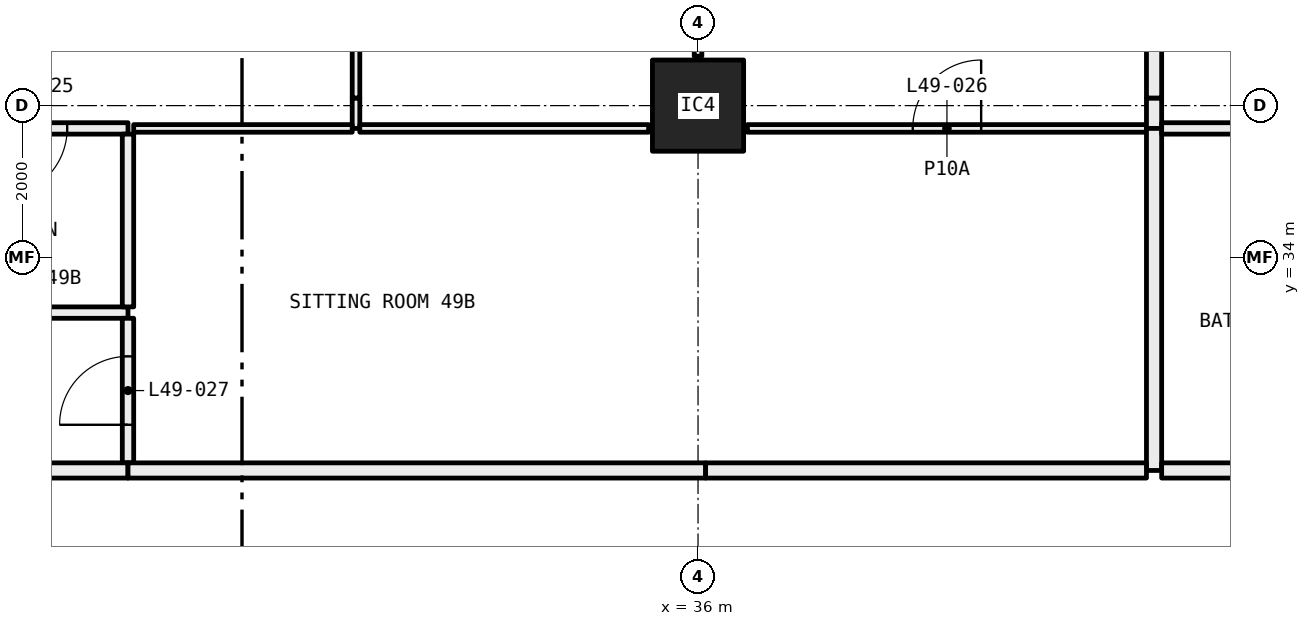
"""IFC4 building model, lengths in metres.
Left out: names, types, materials, properties, quantities, classifications, styles, units other than length and angle.
Written with IfcOpenShell. Run it as: python <this file> out.ifc"""

import sys

from ifc_helpers import new_model, si_unit, direction, frame, frame_2d, origin, origin_2d, place, context, subcontext, project, spatial, rectangle, hollow_rectangle, extrude, element, fill, save


model = new_model("IFC4")
c1 = context("Model", 3, precision=1e-05, world=origin(), true_north=direction((0.0, 1.0)))
c2 = subcontext(c1, "Body", "Model", "MODEL_VIEW")
j1 = project(units=[si_unit("LENGTHUNIT", "METRE"), si_unit("PLANEANGLEUNIT", "RADIAN")], contexts=[c1])
p1 = place(None, origin())
s1 = spatial("IfcSite", under=j1, at=p1, CompositionType="ELEMENT")
p2 = place(p1, origin())
s2 = spatial("IfcBuilding", under=s1, at=p2, CompositionType="ELEMENT")
p3 = place(p2, frame((0.0, 0.0, 185.85)))
s3 = spatial("IfcBuildingStorey", under=s2, at=p3, CompositionType="ELEMENT", Elevation=185.85)
p4 = place(p3, frame((36.0, 36.0, 0.0), z_axis=(0.0, 0.0, 1.0), x_axis=(1.0, 0.0, 0.0)))
e1 = element("IfcColumn", 1, at=p4, inside=s3, PredefinedType="COLUMN", context=c2, shape_type="SweptSolid", body=[
    extrude(hollow_rectangle(XDim=1.2, YDim=1.2, WallThickness=0.05, at=origin_2d()), origin(), (0.0, 0.0, 1.0), 3.05),
])
p5 = place(p3, frame((31.5, 35.7, 0.0), z_axis=(0.0, 0.0, 1.0), x_axis=(0.0, 1.0, 0.0)))
e2 = element("IfcWall", 2, at=p5, inside=s3, PredefinedType="PARTITIONING", context=c2, shape_type="SweptSolid", body=[
    extrude(rectangle(XDim=0.4, YDim=0.1, at=frame_2d((0.2, 0.0))), origin(), (0.0, 0.0, 1.0), 2.45),
])
p6 = place(p3, frame((31.5, 36.1, 0.0), z_axis=(0.0, 0.0, 1.0), x_axis=(0.0, 1.0, 0.0)))
e3 = element("IfcWall", 3, at=p6, inside=s3, PredefinedType="PARTITIONING", context=c2, shape_type="SweptSolid", body=[
    extrude(rectangle(XDim=5.85, YDim=0.1, at=frame_2d((2.925, 0.0))), origin(), (0.0, 0.0, 1.0), 3.05),
])
p7 = place(p6, frame((2.475, 0.0, 0.0)))
e4 = element("IfcOpeningElement", 4, at=p7, cuts=e3, PredefinedType="OPENING", context=c2, shape_type="SweptSolid", body=[
    extrude(rectangle(XDim=0.9, YDim=2.1, at=frame_2d((0.45, 1.05))), frame((0.0, 0.06, 0.0), z_axis=(0.0, -1.0, 0.0), x_axis=(1.0, 0.0, 0.0)), (0.0, 0.0, 1.0), 0.12),
])
p8 = place(p3, frame((26.0, 35.7, 0.0), z_axis=(0.0, 0.0, 1.0), x_axis=(1.0, 0.0, 0.0)))
e5 = element("IfcWall", 5, at=p8, inside=s3, PredefinedType="PARTITIONING", context=c2, shape_type="SweptSolid", body=[
    extrude(rectangle(XDim=2.5, YDim=0.15, at=frame_2d((1.25, 0.0))), origin(), (0.0, 0.0, 1.0), 3.05),
])
p9 = place(p8, frame((0.8, 0.0, 0.0)))
e6 = element("IfcOpeningElement", 6, at=p9, cuts=e5, PredefinedType="OPENING", context=c2, shape_type="SweptSolid", body=[
    extrude(rectangle(XDim=0.9, YDim=2.1, at=frame_2d((0.45, 1.05))), frame((0.0, 0.085, 0.0), z_axis=(0.0, -1.0, 0.0), x_axis=(1.0, 0.0, 0.0)), (0.0, 0.0, 1.0), 0.17),
])
p10 = place(p3, frame((28.575, 35.7, 0.0), z_axis=(0.0, 0.0, 1.0), x_axis=(1.0, 0.0, 0.0)))
e7 = element("IfcWall", 7, at=p10, inside=s3, PredefinedType="PARTITIONING", context=c2, shape_type="SweptSolid", body=[
    extrude(rectangle(XDim=2.875, YDim=0.1, at=frame_2d((1.438, 0.0))), origin(), (0.0, 0.0, 1.0), 3.05),
])
p11 = place(p3, frame((36.0, 36.65, 0.0), z_axis=(0.0, 0.0, 1.0), x_axis=(0.0, 1.0, 0.0)))
e8 = element("IfcWall", 8, at=p11, inside=s3, PredefinedType="PARTITIONING", context=c2, shape_type="SweptSolid", body=[
    extrude(rectangle(XDim=5.275, YDim=0.1, at=frame_2d((2.638, 0.0))), origin(), (0.0, 0.0, 1.0), 2.45),
])
p12 = place(p11, frame((2.188, 0.0, 0.0)))
e9 = element("IfcOpeningElement", 9, at=p12, cuts=e8, PredefinedType="OPENING", context=c2, shape_type="SweptSolid", body=[
    extrude(rectangle(XDim=0.9, YDim=2.1, at=frame_2d((0.45, 1.05))), frame((0.0, 0.06, 0.0), z_axis=(0.0, -1.0, 0.0), x_axis=(1.0, 0.0, 0.0)), (0.0, 0.0, 1.0), 0.12),
])
p13 = place(p3, frame((31.55, 35.7, 0.0), z_axis=(0.0, 0.0, 1.0), x_axis=(1.0, 0.0, 0.0)))
e10 = element("IfcWall", 10, at=p13, inside=s3, PredefinedType="PARTITIONING", context=c2, shape_type="SweptSolid", body=[
    extrude(rectangle(XDim=3.8, YDim=0.1, at=frame_2d((1.9, 0.0))), origin(), (0.0, 0.0, 1.0), 3.05),
])
p14 = place(p3, frame((36.65, 35.7, 0.0), z_axis=(0.0, 0.0, 1.0), x_axis=(1.0, 0.0, 0.0)))
e11 = element("IfcWall", 11, at=p14, inside=s3, PredefinedType="PARTITIONING", context=c2, shape_type="SweptSolid", body=[
    extrude(rectangle(XDim=5.25, YDim=0.1, at=frame_2d((2.625, 0.0))), origin(), (0.0, 0.0, 1.0), 3.05),
])
p15 = place(p14, frame((2.175, 0.0, 0.0)))
e12 = element("IfcOpeningElement", 12, at=p15, cuts=e11, PredefinedType="OPENING", context=c2, shape_type="SweptSolid", body=[
    extrude(rectangle(XDim=0.9, YDim=2.1, at=frame_2d((0.45, 1.05))), frame((0.0, 0.06, 0.0), z_axis=(0.0, -1.0, 0.0), x_axis=(1.0, 0.0, 0.0)), (0.0, 0.0, 1.0), 0.12),
])
p16 = place(p3, frame((42.0, 35.7, 0.0), z_axis=(0.0, 0.0, 1.0), x_axis=(0.0, 1.0, 0.0)))
e13 = element("IfcWall", 13, at=p16, inside=s3, PredefinedType="PARTITIONING", context=c2, shape_type="SweptSolid", body=[
    extrude(rectangle(XDim=0.4, YDim=0.2, at=frame_2d((0.2, 0.0))), origin(), (0.0, 0.0, 1.0), 2.45),
])
p17 = place(p3, frame((42.0, 36.1, 0.0), z_axis=(0.0, 0.0, 1.0), x_axis=(0.0, 1.0, 0.0)))
e14 = element("IfcWall", 14, at=p17, inside=s3, PredefinedType="PARTITIONING", context=c2, shape_type="SweptSolid", body=[
    extrude(rectangle(XDim=5.9, YDim=0.2, at=frame_2d((2.95, 0.0))), origin(), (0.0, 0.0, 1.0), 3.05),
])
p18 = place(p3, frame((28.5, 33.277, 0.0), z_axis=(0.0, 0.0, 1.0), x_axis=(-1.0, 0.0, 0.0)))
e15 = element("IfcWall", 15, at=p18, inside=s3, PredefinedType="PARTITIONING", context=c2, shape_type="SweptSolid", body=[
    extrude(rectangle(XDim=2.5, YDim=0.15, at=frame_2d((1.25, 0.0))), origin(), (0.0, 0.0, 1.0), 3.05),
])
p19 = place(p3, frame((28.5, 31.3, 0.0), z_axis=(0.0, 0.0, 1.0), x_axis=(0.0, 1.0, 0.0)))
e16 = element("IfcWall", 16, at=p19, inside=s3, PredefinedType="PARTITIONING", context=c2, shape_type="SweptSolid", body=[
    extrude(rectangle(XDim=1.902, YDim=0.15, at=frame_2d((0.951, 0.0))), origin(), (0.0, 0.0, 1.0), 3.05),
])
p20 = place(p19, frame((0.501, 0.0, 0.0)))
e17 = element("IfcOpeningElement", 17, at=p20, cuts=e16, PredefinedType="OPENING", context=c2, shape_type="SweptSolid", body=[
    extrude(rectangle(XDim=0.9, YDim=2.1, at=frame_2d((0.45, 1.05))), frame((0.0, 0.085, 0.0), z_axis=(0.0, -1.0, 0.0), x_axis=(1.0, 0.0, 0.0)), (0.0, 0.0, 1.0), 0.17),
])
p21 = place(p3, frame((26.0, 31.2, 0.0), z_axis=(0.0, 0.0, 1.0), x_axis=(1.0, 0.0, 0.0)))
e18 = element("IfcWall", 18, at=p21, inside=s3, PredefinedType="PARTITIONING", context=c2, shape_type="SweptSolid", body=[
    extrude(rectangle(XDim=2.5, YDim=0.2, at=frame_2d((1.25, 0.0))), origin(), (0.0, 0.0, 1.0), 3.05),
])
p22 = place(p3, frame((28.5, 33.352, 0.0), z_axis=(0.0, 0.0, 1.0), x_axis=(0.0, 1.0, 0.0)))
e19 = element("IfcWall", 19, at=p22, inside=s3, PredefinedType="PARTITIONING", context=c2, shape_type="SweptSolid", body=[
    extrude(rectangle(XDim=2.273, YDim=0.15, at=frame_2d((1.136, 0.0))), origin(), (0.0, 0.0, 1.0), 3.05),
])
p23 = place(p3, frame((42.0, 31.2, 0.0), z_axis=(0.0, 0.0, 1.0), x_axis=(0.0, 1.0, 0.0)))
e20 = element("IfcWall", 20, at=p23, inside=s3, PredefinedType="PARTITIONING", context=c2, shape_type="SweptSolid", body=[
    extrude(rectangle(XDim=4.5, YDim=0.2, at=frame_2d((2.25, 0.0))), origin(), (0.0, 0.0, 1.0), 3.05),
])
p24 = place(p3, frame((28.5, 31.2, 0.0), z_axis=(0.0, 0.0, 1.0), x_axis=(1.0, 0.0, 0.0)))
e21 = element("IfcWall", 21, at=p24, inside=s3, PredefinedType="PARTITIONING", context=c2, shape_type="SweptSolid", body=[
    extrude(rectangle(XDim=7.6, YDim=0.2, at=frame_2d((3.8, 0.0))), origin(), (0.0, 0.0, 1.0), 2.45),
])
p25 = place(p3, frame((36.1, 31.2, 0.0), z_axis=(0.0, 0.0, 1.0), x_axis=(1.0, 0.0, 0.0)))
e22 = element("IfcWall", 22, at=p25, inside=s3, PredefinedType="PARTITIONING", context=c2, shape_type="SweptSolid", body=[
    extrude(rectangle(XDim=5.8, YDim=0.2, at=frame_2d((2.9, 0.0))), origin(), (0.0, 0.0, 1.0), 3.05),
])
p26 = place(p3, frame((42.1, 35.7, 0.0), z_axis=(0.0, 0.0, 1.0), x_axis=(1.0, 0.0, 0.0)))
e23 = element("IfcWall", 23, at=p26, inside=s3, PredefinedType="PARTITIONING", context=c2, shape_type="SweptSolid", body=[
    extrude(rectangle(XDim=3.9, YDim=0.15, at=frame_2d((1.95, 0.0))), origin(), (0.0, 0.0, 1.0), 3.05),
])
p27 = place(p26, frame((1.5, 0.0, 0.0)))
e24 = element("IfcOpeningElement", 24, at=p27, cuts=e23, PredefinedType="OPENING", context=c2, shape_type="SweptSolid", body=[
    extrude(rectangle(XDim=0.9, YDim=2.1, at=frame_2d((0.45, 1.05))), frame((0.0, 0.085, 0.0), z_axis=(0.0, -1.0, 0.0), x_axis=(1.0, 0.0, 0.0)), (0.0, 0.0, 1.0), 0.17),
])
p28 = place(p3, frame((42.1, 31.2, 0.0), z_axis=(0.0, 0.0, 1.0), x_axis=(1.0, 0.0, 0.0)))
e25 = element("IfcWall", 25, at=p28, inside=s3, PredefinedType="PARTITIONING", context=c2, shape_type="SweptSolid", body=[
    extrude(rectangle(XDim=4.0, YDim=0.2, at=frame_2d((2.0, 0.0))), origin(), (0.0, 0.0, 1.0), 3.05),
])
p29 = place(p9, frame((0.9, 0.0, 0.0), x_axis=(-1.0, 0.0, 0.0)))
e26 = element("IfcDoor", 26, at=p29, inside=s3, OperationType="SINGLE_SWING_LEFT", PredefinedType="DOOR", context=c2, shape_type="SweptSolid", body=[
    extrude(rectangle(XDim=0.9, YDim=2.1, at=frame_2d((0.45, 1.05))), frame((0.0, 0.025, 0.0), z_axis=(0.0, -1.0, 0.0), x_axis=(1.0, 0.0, 0.0)), (0.0, 0.0, 1.0), 0.05),
])
fill(e6, e26)
p30 = place(p15, origin())
e27 = element("IfcDoor", 27, at=p30, inside=s3, OperationType="SINGLE_SWING_LEFT", PredefinedType="DOOR", context=c2, shape_type="SweptSolid", body=[
    extrude(rectangle(XDim=0.9, YDim=2.1, at=frame_2d((0.45, 1.05))), frame((0.0, 0.025, 0.0), z_axis=(0.0, -1.0, 0.0), x_axis=(1.0, 0.0, 0.0)), (0.0, 0.0, 1.0), 0.05),
])
fill(e12, e27)
p31 = place(p20, origin())
e28 = element("IfcDoor", 28, at=p31, inside=s3, OperationType="SINGLE_SWING_RIGHT", PredefinedType="DOOR", context=c2, shape_type="SweptSolid", body=[
    extrude(rectangle(XDim=0.9, YDim=2.1, at=frame_2d((0.45, 1.05))), frame((0.0, 0.025, 0.0), z_axis=(0.0, -1.0, 0.0), x_axis=(1.0, 0.0, 0.0)), (0.0, 0.0, 1.0), 0.05),
])
fill(e17, e28)
save(model, sys.argv[1])
